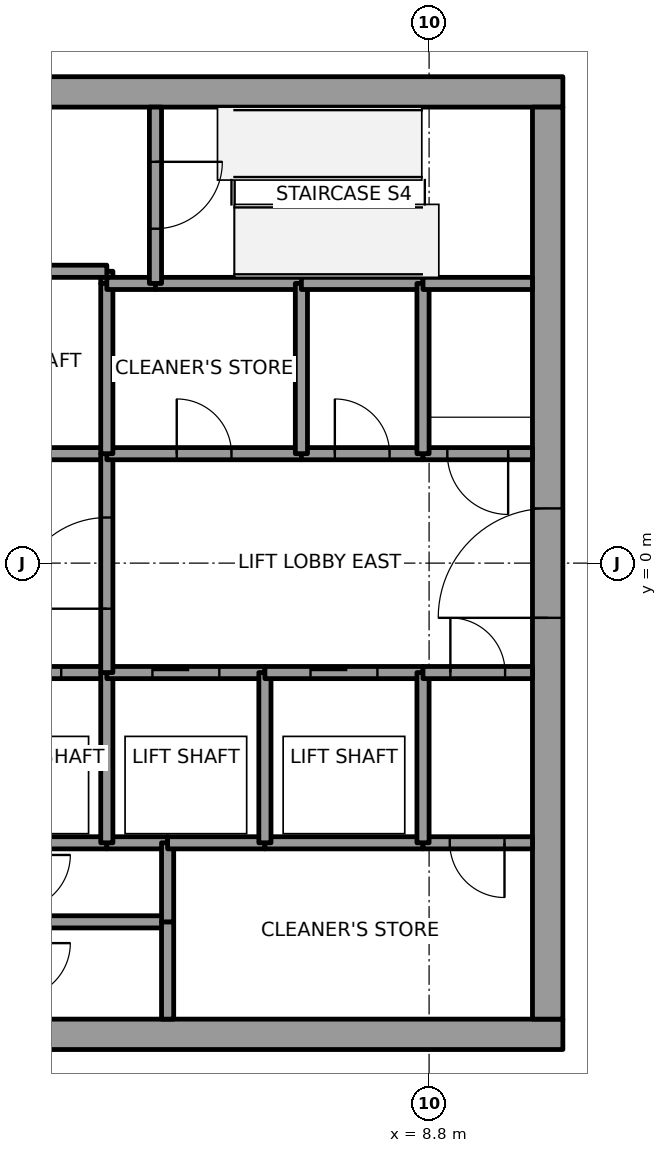
"""IFC4 building model, lengths in metres.
Left out: names, types, materials, properties, quantities, classifications, styles, units other than length and angle.
Written with IfcOpenShell. Run it as: python <this file> out.ifc"""

import sys

from ifc_helpers import new_model, si_unit, direction, frame, frame_2d, origin, place, context, subcontext, project, spatial, rectangle, extrude, element, fill, save


model = new_model("IFC4")
c1 = context("Model", 3, precision=1e-05, world=origin(), true_north=direction((0.0, 1.0)))
c2 = subcontext(c1, "Body", "Model", "MODEL_VIEW")
j1 = project(units=[si_unit("LENGTHUNIT", "METRE"), si_unit("PLANEANGLEUNIT", "RADIAN")], contexts=[c1])
p1 = place(None, origin())
s1 = spatial("IfcSite", under=j1, at=p1, CompositionType="ELEMENT")
p2 = place(p1, origin())
s2 = spatial("IfcBuilding", under=s1, at=p2, CompositionType="ELEMENT")
p3 = place(p2, frame((0.0, 0.0, 227.0)))
s3 = spatial("IfcBuildingStorey", under=s2, at=p3, CompositionType="ELEMENT", Elevation=227.0)
p4 = place(p3, frame((-11.0, -7.75, 0.0), z_axis=(0.0, 0.0, 1.0), x_axis=(1.0, 0.0, 0.0)))
e1 = element("IfcWall", 1, at=p4, inside=s3, PredefinedType="SHEAR", context=c2, shape_type="SweptSolid", body=[
    extrude(rectangle(XDim=22.0, YDim=0.5, at=frame_2d((11.0, 0.0))), origin(), (0.0, 0.0, 1.0), 4.0),
])
p5 = place(p4, frame((10.45, 0.0, 0.0)))
e2 = element("IfcOpeningElement", 2, at=p5, cuts=e1, PredefinedType="OPENING", context=c2, shape_type="SweptSolid", body=[
    extrude(rectangle(XDim=1.1, YDim=2.1, at=frame_2d((0.55, 1.05))), frame((0.0, 0.25, 0.0), z_axis=(0.0, -1.0, 0.0), x_axis=(1.0, 0.0, 0.0)), (0.0, 0.0, 1.0), 0.5),
])
p6 = place(p3, frame((-11.0, 7.75, 0.0), z_axis=(0.0, 0.0, 1.0), x_axis=(1.0, 0.0, 0.0)))
e3 = element("IfcWall", 3, at=p6, inside=s3, PredefinedType="SHEAR", context=c2, shape_type="SweptSolid", body=[
    extrude(rectangle(XDim=22.0, YDim=0.5, at=frame_2d((11.0, 0.0))), origin(), (0.0, 0.0, 1.0), 4.0),
])
p7 = place(p6, frame((10.45, 0.0, 0.0)))
e4 = element("IfcOpeningElement", 4, at=p7, cuts=e3, PredefinedType="OPENING", context=c2, shape_type="SweptSolid", body=[
    extrude(rectangle(XDim=1.1, YDim=2.1, at=frame_2d((0.55, 1.05))), frame((0.0, 0.25, 0.0), z_axis=(0.0, -1.0, 0.0), x_axis=(1.0, 0.0, 0.0)), (0.0, 0.0, 1.0), 0.5),
])
p8 = place(p3, frame((10.75, -7.5, 0.0), z_axis=(0.0, 0.0, 1.0), x_axis=(0.0, 1.0, 0.0)))
e5 = element("IfcWall", 5, at=p8, inside=s3, PredefinedType="SHEAR", context=c2, shape_type="SweptSolid", body=[
    extrude(rectangle(XDim=15.0, YDim=0.5, at=frame_2d((7.5, 0.0))), origin(), (0.0, 0.0, 1.0), 4.0),
])
p9 = place(p8, frame((6.6, 0.0, 0.0)))
e6 = element("IfcOpeningElement", 6, at=p9, cuts=e5, PredefinedType="OPENING", context=c2, shape_type="SweptSolid", body=[
    extrude(rectangle(XDim=1.8, YDim=2.1, at=frame_2d((0.9, 1.05))), frame((0.0, 0.25, 0.0), z_axis=(0.0, -1.0, 0.0), x_axis=(1.0, 0.0, 0.0)), (0.0, 0.0, 1.0), 0.5),
])
p10 = place(p3, frame((0.9, -1.8, 0.0), z_axis=(0.0, 0.0, 1.0), x_axis=(1.0, 0.0, 0.0)))
e7 = element("IfcWall", 7, at=p10, inside=s3, PredefinedType="SOLIDWALL", context=c2, shape_type="SweptSolid", body=[
    extrude(rectangle(XDim=2.6, YDim=0.2, at=frame_2d((1.3, 0.0))), origin(), (0.0, 0.0, 1.0), 3.85),
])
p11 = place(p10, frame((0.75, 0.0, 0.0)))
e8 = element("IfcOpeningElement", 8, at=p11, cuts=e7, PredefinedType="OPENING", context=c2, shape_type="SweptSolid", body=[
    extrude(rectangle(XDim=1.1, YDim=2.1, at=frame_2d((0.55, 1.05))), frame((0.0, 0.1, 0.0), z_axis=(0.0, -1.0, 0.0), x_axis=(1.0, 0.0, 0.0)), (0.0, 0.0, 1.0), 0.2),
])
p12 = place(p3, frame((3.5, 1.8, 0.0), z_axis=(0.0, 0.0, 1.0), x_axis=(-1.0, 0.0, 0.0)))
e9 = element("IfcWall", 9, at=p12, inside=s3, PredefinedType="SOLIDWALL", context=c2, shape_type="SweptSolid", body=[
    extrude(rectangle(XDim=2.6, YDim=0.2, at=frame_2d((1.3, 0.0))), origin(), (0.0, 0.0, 1.0), 3.85),
])
p13 = place(p3, frame((3.5, 4.6, 0.0), z_axis=(0.0, 0.0, 1.0), x_axis=(0.0, 1.0, 0.0)))
e10 = element("IfcWall", 10, at=p13, inside=s3, PredefinedType="SOLIDWALL", context=c2, shape_type="SweptSolid", body=[
    extrude(rectangle(XDim=0.2, YDim=0.2, at=frame_2d((0.1, 0.0))), origin(), (0.0, 0.0, 1.0), 3.85),
])
p14 = place(p3, frame((3.5, 4.8, 0.0), z_axis=(0.0, 0.0, 1.0), x_axis=(-1.0, 0.0, 0.0)))
e11 = element("IfcWall", 11, at=p14, inside=s3, PredefinedType="SOLIDWALL", context=c2, shape_type="SweptSolid", body=[
    extrude(rectangle(XDim=2.6, YDim=0.2, at=frame_2d((1.3, 0.0))), origin(), (0.0, 0.0, 1.0), 3.85),
])
p15 = place(p3, frame((4.5, -5.9, 0.0), z_axis=(0.0, 0.0, 1.0), x_axis=(-1.0, 0.0, 0.0)))
e12 = element("IfcWall", 12, at=p15, inside=s3, PredefinedType="SOLIDWALL", context=c2, shape_type="SweptSolid", body=[
    extrude(rectangle(XDim=2.5, YDim=0.2, at=frame_2d((1.25, 0.0))), origin(), (0.0, 0.0, 1.0), 3.85),
])
p16 = place(p3, frame((3.5, -4.6, 0.0), z_axis=(0.0, 0.0, 1.0), x_axis=(-1.0, 0.0, 0.0)))
e13 = element("IfcWall", 13, at=p16, inside=s3, PredefinedType="SOLIDWALL", context=c2, shape_type="SweptSolid", body=[
    extrude(rectangle(XDim=1.5, YDim=0.2, at=frame_2d((0.75, 0.0))), origin(), (0.0, 0.0, 1.0), 3.85),
])
p17 = place(p3, frame((4.5, -4.6, 0.0), z_axis=(0.0, 0.0, 1.0), x_axis=(-1.0, 0.0, 0.0)))
e14 = element("IfcWall", 14, at=p17, inside=s3, PredefinedType="SOLIDWALL", context=c2, shape_type="SweptSolid", body=[
    extrude(rectangle(XDim=1.0, YDim=0.2, at=frame_2d((0.5, 0.0))), origin(), (0.0, 0.0, 1.0), 3.85),
])
p18 = place(p3, frame((3.5, -4.6, 0.0), z_axis=(0.0, 0.0, 1.0), x_axis=(0.0, 1.0, 0.0)))
e15 = element("IfcWall", 15, at=p18, inside=s3, PredefinedType="SOLIDWALL", context=c2, shape_type="SweptSolid", body=[
    extrude(rectangle(XDim=2.8, YDim=0.2, at=frame_2d((1.4, 0.0))), origin(), (0.0, 0.0, 1.0), 3.85),
])
p19 = place(p3, frame((3.5, -1.8, 0.0), z_axis=(0.0, 0.0, 1.0), x_axis=(1.0, 0.0, 0.0)))
e16 = element("IfcWall", 16, at=p19, inside=s3, PredefinedType="SOLIDWALL", context=c2, shape_type="SweptSolid", body=[
    extrude(rectangle(XDim=2.6, YDim=0.2, at=frame_2d((1.3, 0.0))), origin(), (0.0, 0.0, 1.0), 3.85),
])
p20 = place(p19, frame((0.75, 0.0, 0.0)))
e17 = element("IfcOpeningElement", 17, at=p20, cuts=e16, PredefinedType="OPENING", context=c2, shape_type="SweptSolid", body=[
    extrude(rectangle(XDim=1.1, YDim=2.1, at=frame_2d((0.55, 1.05))), frame((0.0, 0.1, 0.0), z_axis=(0.0, -1.0, 0.0), x_axis=(1.0, 0.0, 0.0)), (0.0, 0.0, 1.0), 0.2),
])
p21 = place(p3, frame((3.5, -1.8, 0.0), z_axis=(0.0, 0.0, 1.0), x_axis=(0.0, 1.0, 0.0)))
e18 = element("IfcWall", 18, at=p21, inside=s3, PredefinedType="SOLIDWALL", context=c2, shape_type="SweptSolid", body=[
    extrude(rectangle(XDim=3.6, YDim=0.2, at=frame_2d((1.8, 0.0))), origin(), (0.0, 0.0, 1.0), 3.85),
])
p22 = place(p21, frame((1.05, 0.0, 0.0)))
e19 = element("IfcOpeningElement", 19, at=p22, cuts=e18, PredefinedType="OPENING", context=c2, shape_type="SweptSolid", body=[
    extrude(rectangle(XDim=1.5, YDim=2.1, at=frame_2d((0.75, 1.05))), frame((0.0, 0.1, 0.0), z_axis=(0.0, -1.0, 0.0), x_axis=(1.0, 0.0, 0.0)), (0.0, 0.0, 1.0), 0.2),
])
p23 = place(p3, frame((3.5, 1.8, 0.0), z_axis=(0.0, 0.0, 1.0), x_axis=(1.0, 0.0, 0.0)))
e20 = element("IfcWall", 20, at=p23, inside=s3, PredefinedType="SOLIDWALL", context=c2, shape_type="SweptSolid", body=[
    extrude(rectangle(XDim=3.2, YDim=0.2, at=frame_2d((1.6, 0.0))), origin(), (0.0, 0.0, 1.0), 3.85),
])
p24 = place(p23, frame((1.15, 0.0, 0.0)))
e21 = element("IfcOpeningElement", 21, at=p24, cuts=e20, PredefinedType="OPENING", context=c2, shape_type="SweptSolid", body=[
    extrude(rectangle(XDim=0.9, YDim=2.1, at=frame_2d((0.45, 1.05))), frame((0.0, 0.1, 0.0), z_axis=(0.0, -1.0, 0.0), x_axis=(1.0, 0.0, 0.0)), (0.0, 0.0, 1.0), 0.2),
])
p25 = place(p3, frame((3.5, 4.6, 0.0), z_axis=(0.0, 0.0, 1.0), x_axis=(0.0, -1.0, 0.0)))
e22 = element("IfcWall", 22, at=p25, inside=s3, PredefinedType="SOLIDWALL", context=c2, shape_type="SweptSolid", body=[
    extrude(rectangle(XDim=2.8, YDim=0.2, at=frame_2d((1.4, 0.0))), origin(), (0.0, 0.0, 1.0), 3.85),
])
p26 = place(p3, frame((4.3, 4.6, 0.0), z_axis=(0.0, 0.0, 1.0), x_axis=(-1.0, 0.0, 0.0)))
e23 = element("IfcWall", 23, at=p26, inside=s3, PredefinedType="SOLIDWALL", context=c2, shape_type="SweptSolid", body=[
    extrude(rectangle(XDim=0.8, YDim=0.2, at=frame_2d((0.4, 0.0))), origin(), (0.0, 0.0, 1.0), 3.85),
])
p27 = place(p3, frame((6.7, 4.6, 0.0), z_axis=(0.0, 0.0, 1.0), x_axis=(-1.0, 0.0, 0.0)))
e24 = element("IfcWall", 24, at=p27, inside=s3, PredefinedType="SOLIDWALL", context=c2, shape_type="SweptSolid", body=[
    extrude(rectangle(XDim=2.4, YDim=0.2, at=frame_2d((1.2, 0.0))), origin(), (0.0, 0.0, 1.0), 3.85),
])
p28 = place(p3, frame((4.3, 7.5, 0.0), z_axis=(0.0, 0.0, 1.0), x_axis=(0.0, -1.0, 0.0)))
e25 = element("IfcWall", 25, at=p28, inside=s3, PredefinedType="SOLIDWALL", context=c2, shape_type="SweptSolid", body=[
    extrude(rectangle(XDim=2.9, YDim=0.2, at=frame_2d((1.45, 0.0))), origin(), (0.0, 0.0, 1.0), 3.85),
])
p29 = place(p28, frame((0.9, 0.0, 0.0)))
e26 = element("IfcOpeningElement", 26, at=p29, cuts=e25, PredefinedType="OPENING", context=c2, shape_type="SweptSolid", body=[
    extrude(rectangle(XDim=1.1, YDim=2.1, at=frame_2d((0.55, 1.05))), frame((0.0, 0.1, 0.0), z_axis=(0.0, -1.0, 0.0), x_axis=(1.0, 0.0, 0.0)), (0.0, 0.0, 1.0), 0.2),
])
p30 = place(p3, frame((4.5, -5.9, 0.0), z_axis=(0.0, 0.0, 1.0), x_axis=(0.0, -1.0, 0.0)))
e27 = element("IfcWall", 27, at=p30, inside=s3, PredefinedType="SOLIDWALL", context=c2, shape_type="SweptSolid", body=[
    extrude(rectangle(XDim=1.6, YDim=0.2, at=frame_2d((0.8, 0.0))), origin(), (0.0, 0.0, 1.0), 3.85),
])
p31 = place(p3, frame((4.5, -4.6, 0.0), z_axis=(0.0, 0.0, 1.0), x_axis=(0.0, -1.0, 0.0)))
e28 = element("IfcWall", 28, at=p31, inside=s3, PredefinedType="SOLIDWALL", context=c2, shape_type="SweptSolid", body=[
    extrude(rectangle(XDim=1.3, YDim=0.2, at=frame_2d((0.65, 0.0))), origin(), (0.0, 0.0, 1.0), 3.85),
])
p32 = place(p3, frame((6.1, -4.6, 0.0), z_axis=(0.0, 0.0, 1.0), x_axis=(-1.0, 0.0, 0.0)))
e29 = element("IfcWall", 29, at=p32, inside=s3, PredefinedType="SOLIDWALL", context=c2, shape_type="SweptSolid", body=[
    extrude(rectangle(XDim=1.6, YDim=0.2, at=frame_2d((0.8, 0.0))), origin(), (0.0, 0.0, 1.0), 3.85),
])
p33 = place(p3, frame((8.7, -4.6, 0.0), z_axis=(0.0, 0.0, 1.0), x_axis=(-1.0, 0.0, 0.0)))
e30 = element("IfcWall", 30, at=p33, inside=s3, PredefinedType="SOLIDWALL", context=c2, shape_type="SweptSolid", body=[
    extrude(rectangle(XDim=2.6, YDim=0.2, at=frame_2d((1.3, 0.0))), origin(), (0.0, 0.0, 1.0), 3.85),
])
p34 = place(p3, frame((6.1, -4.6, 0.0), z_axis=(0.0, 0.0, 1.0), x_axis=(0.0, 1.0, 0.0)))
e31 = element("IfcWall", 31, at=p34, inside=s3, PredefinedType="SOLIDWALL", context=c2, shape_type="SweptSolid", body=[
    extrude(rectangle(XDim=2.8, YDim=0.2, at=frame_2d((1.4, 0.0))), origin(), (0.0, 0.0, 1.0), 3.85),
])
p35 = place(p3, frame((6.1, -1.8, 0.0), z_axis=(0.0, 0.0, 1.0), x_axis=(1.0, 0.0, 0.0)))
e32 = element("IfcWall", 32, at=p35, inside=s3, PredefinedType="SOLIDWALL", context=c2, shape_type="SweptSolid", body=[
    extrude(rectangle(XDim=2.6, YDim=0.2, at=frame_2d((1.3, 0.0))), origin(), (0.0, 0.0, 1.0), 3.85),
])
p36 = place(p35, frame((0.75, 0.0, 0.0)))
e33 = element("IfcOpeningElement", 33, at=p36, cuts=e32, PredefinedType="OPENING", context=c2, shape_type="SweptSolid", body=[
    extrude(rectangle(XDim=1.1, YDim=2.1, at=frame_2d((0.55, 1.05))), frame((0.0, 0.1, 0.0), z_axis=(0.0, -1.0, 0.0), x_axis=(1.0, 0.0, 0.0)), (0.0, 0.0, 1.0), 0.2),
])
p37 = place(p3, frame((6.7, 1.8, 0.0), z_axis=(0.0, 0.0, 1.0), x_axis=(1.0, 0.0, 0.0)))
e34 = element("IfcWall", 34, at=p37, inside=s3, PredefinedType="SOLIDWALL", context=c2, shape_type="SweptSolid", body=[
    extrude(rectangle(XDim=2.0, YDim=0.2, at=frame_2d((1.0, 0.0))), origin(), (0.0, 0.0, 1.0), 3.85),
])
p38 = place(p37, frame((0.55, 0.0, 0.0)))
e35 = element("IfcOpeningElement", 35, at=p38, cuts=e34, PredefinedType="OPENING", context=c2, shape_type="SweptSolid", body=[
    extrude(rectangle(XDim=0.9, YDim=2.1, at=frame_2d((0.45, 1.05))), frame((0.0, 0.1, 0.0), z_axis=(0.0, -1.0, 0.0), x_axis=(1.0, 0.0, 0.0)), (0.0, 0.0, 1.0), 0.2),
])
p39 = place(p3, frame((6.7, 1.8, 0.0), z_axis=(0.0, 0.0, 1.0), x_axis=(0.0, 1.0, 0.0)))
e36 = element("IfcWall", 36, at=p39, inside=s3, PredefinedType="SOLIDWALL", context=c2, shape_type="SweptSolid", body=[
    extrude(rectangle(XDim=2.8, YDim=0.2, at=frame_2d((1.4, 0.0))), origin(), (0.0, 0.0, 1.0), 3.85),
])
p40 = place(p3, frame((8.7, 4.6, 0.0), z_axis=(0.0, 0.0, 1.0), x_axis=(-1.0, 0.0, 0.0)))
e37 = element("IfcWall", 37, at=p40, inside=s3, PredefinedType="SOLIDWALL", context=c2, shape_type="SweptSolid", body=[
    extrude(rectangle(XDim=2.0, YDim=0.2, at=frame_2d((1.0, 0.0))), origin(), (0.0, 0.0, 1.0), 3.85),
])
p41 = place(p3, frame((10.5, -4.6, 0.0), z_axis=(0.0, 0.0, 1.0), x_axis=(-1.0, 0.0, 0.0)))
e38 = element("IfcWall", 38, at=p41, inside=s3, PredefinedType="SOLIDWALL", context=c2, shape_type="SweptSolid", body=[
    extrude(rectangle(XDim=1.8, YDim=0.2, at=frame_2d((0.9, 0.0))), origin(), (0.0, 0.0, 1.0), 3.85),
])
p42 = place(p41, frame((0.46, 0.0, 0.0)))
e39 = element("IfcOpeningElement", 39, at=p42, cuts=e38, PredefinedType="OPENING", context=c2, shape_type="SweptSolid", body=[
    extrude(rectangle(XDim=0.9, YDim=2.1, at=frame_2d((0.45, 1.05))), frame((0.0, 0.1, 0.0), z_axis=(0.0, -1.0, 0.0), x_axis=(1.0, 0.0, 0.0)), (0.0, 0.0, 1.0), 0.2),
])
p43 = place(p3, frame((8.7, -1.8, 0.0), z_axis=(0.0, 0.0, 1.0), x_axis=(0.0, -1.0, 0.0)))
e40 = element("IfcWall", 40, at=p43, inside=s3, PredefinedType="SOLIDWALL", context=c2, shape_type="SweptSolid", body=[
    extrude(rectangle(XDim=2.8, YDim=0.2, at=frame_2d((1.4, 0.0))), origin(), (0.0, 0.0, 1.0), 3.85),
])
p44 = place(p3, frame((8.7, -1.8, 0.0), z_axis=(0.0, 0.0, 1.0), x_axis=(1.0, 0.0, 0.0)))
e41 = element("IfcWall", 41, at=p44, inside=s3, PredefinedType="SOLIDWALL", context=c2, shape_type="SweptSolid", body=[
    extrude(rectangle(XDim=1.8, YDim=0.2, at=frame_2d((0.9, 0.0))), origin(), (0.0, 0.0, 1.0), 3.85),
])
p45 = place(p44, frame((0.45, 0.0, 0.0)))
e42 = element("IfcOpeningElement", 42, at=p45, cuts=e41, PredefinedType="OPENING", context=c2, shape_type="SweptSolid", body=[
    extrude(rectangle(XDim=0.9, YDim=2.1, at=frame_2d((0.45, 1.05))), frame((0.0, 0.1, 0.0), z_axis=(0.0, -1.0, 0.0), x_axis=(1.0, 0.0, 0.0)), (0.0, 0.0, 1.0), 0.2),
])
p46 = place(p3, frame((10.5, 1.8, 0.0), z_axis=(0.0, 0.0, 1.0), x_axis=(-1.0, 0.0, 0.0)))
e43 = element("IfcWall", 43, at=p46, inside=s3, PredefinedType="SOLIDWALL", context=c2, shape_type="SweptSolid", body=[
    extrude(rectangle(XDim=1.8, YDim=0.2, at=frame_2d((0.9, 0.0))), origin(), (0.0, 0.0, 1.0), 3.85),
])
p47 = place(p46, frame((0.4, 0.0, 0.0)))
e44 = element("IfcOpeningElement", 44, at=p47, cuts=e43, PredefinedType="OPENING", context=c2, shape_type="SweptSolid", body=[
    extrude(rectangle(XDim=1.0, YDim=2.1, at=frame_2d((0.5, 1.05))), frame((0.0, 0.1, 0.0), z_axis=(0.0, -1.0, 0.0), x_axis=(1.0, 0.0, 0.0)), (0.0, 0.0, 1.0), 0.2),
])
p48 = place(p3, frame((8.7, 1.8, 0.0), z_axis=(0.0, 0.0, 1.0), x_axis=(0.0, 1.0, 0.0)))
e45 = element("IfcWall", 45, at=p48, inside=s3, PredefinedType="SOLIDWALL", context=c2, shape_type="SweptSolid", body=[
    extrude(rectangle(XDim=2.8, YDim=0.2, at=frame_2d((1.4, 0.0))), origin(), (0.0, 0.0, 1.0), 3.85),
])
p49 = place(p3, frame((10.5, 4.6, 0.0), z_axis=(0.0, 0.0, 1.0), x_axis=(-1.0, 0.0, 0.0)))
e46 = element("IfcWall", 46, at=p49, inside=s3, PredefinedType="SOLIDWALL", context=c2, shape_type="SweptSolid", body=[
    extrude(rectangle(XDim=1.8, YDim=0.2, at=frame_2d((0.9, 0.0))), origin(), (0.0, 0.0, 1.0), 3.85),
])
p50 = place(p11, origin())
e47 = element("IfcDoor", 47, at=p50, inside=s3, OperationType="SLIDING_TO_LEFT", PredefinedType="DOOR", context=c2, shape_type="SweptSolid", body=[
    extrude(rectangle(XDim=1.1, YDim=2.1, at=frame_2d((0.55, 1.05))), frame((0.0, 0.025, 0.0), z_axis=(0.0, -1.0, 0.0), x_axis=(1.0, 0.0, 0.0)), (0.0, 0.0, 1.0), 0.05),
])
fill(e8, e47)
p51 = place(p20, origin())
e48 = element("IfcDoor", 48, at=p51, inside=s3, OperationType="SLIDING_TO_RIGHT", PredefinedType="DOOR", context=c2, shape_type="SweptSolid", body=[
    extrude(rectangle(XDim=1.1, YDim=2.1, at=frame_2d((0.55, 1.05))), frame((0.0, 0.025, 0.0), z_axis=(0.0, -1.0, 0.0), x_axis=(1.0, 0.0, 0.0)), (0.0, 0.0, 1.0), 0.05),
])
fill(e17, e48)
p52 = place(p36, origin())
e49 = element("IfcDoor", 49, at=p52, inside=s3, OperationType="SLIDING_TO_LEFT", PredefinedType="DOOR", context=c2, shape_type="SweptSolid", body=[
    extrude(rectangle(XDim=1.1, YDim=2.1, at=frame_2d((0.55, 1.05))), frame((0.0, 0.025, 0.0), z_axis=(0.0, -1.0, 0.0), x_axis=(1.0, 0.0, 0.0)), (0.0, 0.0, 1.0), 0.05),
])
fill(e33, e49)
p53 = place(p22, origin())
e50 = element("IfcDoor", 50, at=p53, inside=s3, OperationType="DOUBLE_DOOR_SINGLE_SWING", PredefinedType="DOOR", context=c2, shape_type="SweptSolid", body=[
    extrude(rectangle(XDim=1.5, YDim=2.1, at=frame_2d((0.75, 1.05))), frame((0.0, 0.025, 0.0), z_axis=(0.0, -1.0, 0.0), x_axis=(1.0, 0.0, 0.0)), (0.0, 0.0, 1.0), 0.05),
])
fill(e19, e50)
p54 = place(p47, origin())
e51 = element("IfcDoor", 51, at=p54, inside=s3, OperationType="SINGLE_SWING_RIGHT", PredefinedType="DOOR", context=c2, shape_type="SweptSolid", body=[
    extrude(rectangle(XDim=1.0, YDim=2.1, at=frame_2d((0.5, 1.05))), frame((0.0, 0.025, 0.0), z_axis=(0.0, -1.0, 0.0), x_axis=(1.0, 0.0, 0.0)), (0.0, 0.0, 1.0), 0.05),
])
fill(e44, e51)
p55 = place(p29, origin())
e52 = element("IfcDoor", 52, at=p55, inside=s3, OperationType="SINGLE_SWING_LEFT", PredefinedType="DOOR", context=c2, shape_type="SweptSolid", body=[
    extrude(rectangle(XDim=1.1, YDim=2.1, at=frame_2d((0.55, 1.05))), frame((0.0, 0.025, 0.0), z_axis=(0.0, -1.0, 0.0), x_axis=(1.0, 0.0, 0.0)), (0.0, 0.0, 1.0), 0.05),
])
fill(e26, e52)
p56 = place(p24, origin())
e53 = element("IfcDoor", 53, at=p56, inside=s3, OperationType="SINGLE_SWING_LEFT", PredefinedType="DOOR", context=c2, shape_type="SweptSolid", body=[
    extrude(rectangle(XDim=0.9, YDim=2.1, at=frame_2d((0.45, 1.05))), frame((0.0, 0.025, 0.0), z_axis=(0.0, -1.0, 0.0), x_axis=(1.0, 0.0, 0.0)), (0.0, 0.0, 1.0), 0.05),
])
fill(e21, e53)
p57 = place(p38, origin())
e54 = element("IfcDoor", 54, at=p57, inside=s3, OperationType="SINGLE_SWING_LEFT", PredefinedType="DOOR", context=c2, shape_type="SweptSolid", body=[
    extrude(rectangle(XDim=0.9, YDim=2.1, at=frame_2d((0.45, 1.05))), frame((0.0, 0.025, 0.0), z_axis=(0.0, -1.0, 0.0), x_axis=(1.0, 0.0, 0.0)), (0.0, 0.0, 1.0), 0.05),
])
fill(e35, e54)
p58 = place(p42, origin())
e55 = element("IfcDoor", 55, at=p58, inside=s3, OperationType="SINGLE_SWING_RIGHT", PredefinedType="DOOR", context=c2, shape_type="SweptSolid", body=[
    extrude(rectangle(XDim=0.9, YDim=2.1, at=frame_2d((0.45, 1.05))), frame((0.0, 0.025, 0.0), z_axis=(0.0, -1.0, 0.0), x_axis=(1.0, 0.0, 0.0)), (0.0, 0.0, 1.0), 0.05),
])
fill(e39, e55)
p59 = place(p45, origin())
e56 = element("IfcDoor", 56, at=p59, inside=s3, OperationType="SINGLE_SWING_LEFT", PredefinedType="DOOR", context=c2, shape_type="SweptSolid", body=[
    extrude(rectangle(XDim=0.9, YDim=2.1, at=frame_2d((0.45, 1.05))), frame((0.0, 0.025, 0.0), z_axis=(0.0, -1.0, 0.0), x_axis=(1.0, 0.0, 0.0)), (0.0, 0.0, 1.0), 0.05),
])
fill(e42, e56)
p60 = place(p9, origin())
e57 = element("IfcDoor", 57, at=p60, inside=s3, OperationType="DOUBLE_DOOR_SINGLE_SWING", PredefinedType="DOOR", context=c2, shape_type="SweptSolid", body=[
    extrude(rectangle(XDim=1.8, YDim=2.1, at=frame_2d((0.9, 1.05))), frame((0.0, 0.025, 0.0), z_axis=(0.0, -1.0, 0.0), x_axis=(1.0, 0.0, 0.0)), (0.0, 0.0, 1.0), 0.05),
])
fill(e6, e57)
save(model, sys.argv[1])
